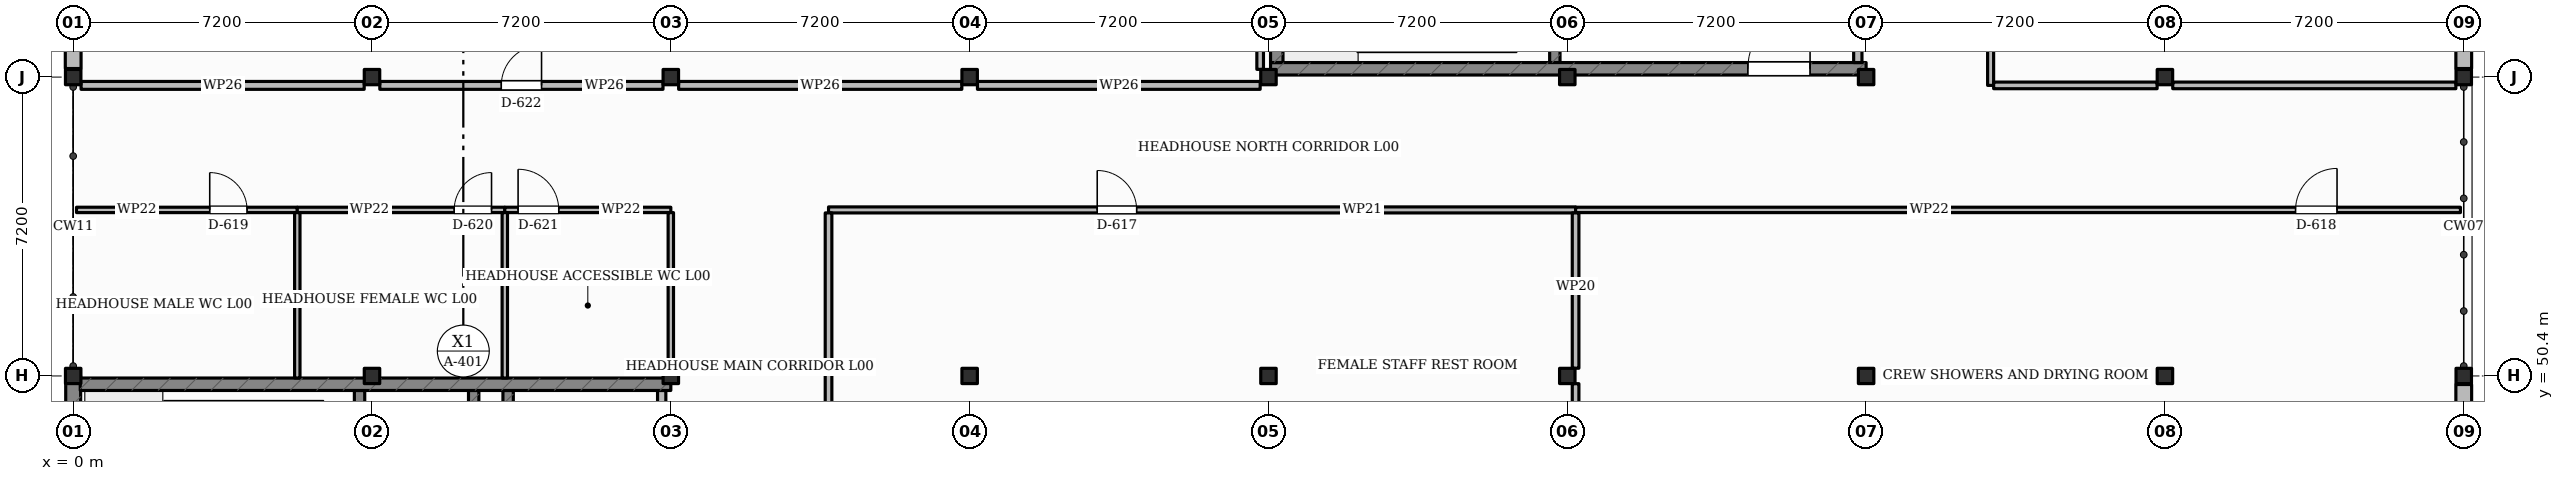
"""IFC4 building model, lengths in metres.
Left out: names, types, materials, properties, quantities, classifications, styles, units other than length and angle.
Written with IfcOpenShell. Run it as: python <this file> out.ifc"""

import sys

from ifc_helpers import new_model, si_unit, direction, frame, frame_2d, origin, origin_2d, place, context, subcontext, project, spatial, rectangle, i_section, extrude, element, fill, save


model = new_model("IFC4")
c1 = context("Model", 3, precision=1e-05, world=origin(), true_north=direction((0.0, 1.0)))
c2 = subcontext(c1, "Body", "Model", "MODEL_VIEW")
j1 = project(units=[si_unit("LENGTHUNIT", "METRE"), si_unit("PLANEANGLEUNIT", "RADIAN")], contexts=[c1])
p1 = place(None, origin())
s1 = spatial("IfcSite", under=j1, at=p1, CompositionType="ELEMENT")
p2 = place(p1, origin())
s2 = spatial("IfcBuilding", under=s1, at=p2, CompositionType="ELEMENT")
p3 = place(p2, origin())
s3 = spatial("IfcBuildingStorey", under=s2, at=p3, CompositionType="ELEMENT", Elevation=0.0)
for number, where, z_axis, x_axis in (
    (1, (0.0, 50.4, -0.3), (0.0, 0.0, 1.0), (1.0, 0.0, 0.0)),
    (2, (0.0, 57.6, -0.3), (0.0, 0.0, 1.0), (1.0, 0.0, 0.0)),
    (3, (7.2, 50.4, -0.3), (0.0, 0.0, 1.0), (1.0, 0.0, 0.0)),
    (4, (7.2, 57.6, -0.3), (0.0, 0.0, 1.0), (1.0, 0.0, 0.0)),
    (5, (14.4, 50.4, -0.3), (0.0, 0.0, 1.0), (1.0, 0.0, 0.0)),
    (6, (14.4, 57.6, -0.3), (0.0, 0.0, 1.0), (1.0, 0.0, 0.0)),
    (7, (21.6, 50.4, -0.3), (0.0, 0.0, 1.0), (1.0, 0.0, 0.0)),
    (8, (21.6, 57.6, -0.3), (0.0, 0.0, 1.0), (1.0, 0.0, 0.0)),
    (9, (28.8, 50.4, -0.3), (0.0, 0.0, 1.0), (1.0, 0.0, 0.0)),
    (10, (28.8, 57.6, -0.3), (0.0, 0.0, 1.0), (1.0, 0.0, 0.0)),
    (11, (36.0, 50.4, -0.3), (0.0, 0.0, 1.0), (1.0, 0.0, 0.0)),
    (12, (36.0, 57.6, -0.3), (0.0, 0.0, 1.0), (1.0, 0.0, 0.0)),
    (13, (43.2, 50.4, -0.3), (0.0, 0.0, 1.0), (1.0, 0.0, 0.0)),
    (14, (43.2, 57.6, -0.3), (0.0, 0.0, 1.0), (1.0, 0.0, 0.0)),
    (15, (50.4, 50.4, -0.3), (0.0, 0.0, 1.0), (1.0, 0.0, 0.0)),
    (16, (50.4, 57.6, -0.3), (0.0, 0.0, 1.0), (1.0, 0.0, 0.0)),
    (17, (57.6, 50.4, -0.3), (0.0, 0.0, 1.0), (1.0, 0.0, 0.0)),
    (18, (57.6, 57.6, -0.3), (0.0, 0.0, 1.0), (1.0, 0.0, 0.0)),
):
    element("IfcColumn", number, at=place(p3, frame(where, z_axis=z_axis, x_axis=x_axis)), inside=s3, PredefinedType="COLUMN", context=c2, shape_type="SweptSolid", body=[
        extrude(i_section(OverallWidth=0.373, OverallDepth=0.368, WebThickness=0.014, FlangeThickness=0.024, FilletRadius=0.015, at=origin_2d()), origin(), (0.0, 0.0, 1.0), 5.7),
    ])
p4 = place(p3, frame((0.0, 43.2, 0.0), z_axis=(0.0, 0.0, 1.0), x_axis=(0.0, 1.0, 0.0)))
e19 = element("IfcWall", 19, at=p4, inside=s3, PredefinedType="SHEAR", context=c2, shape_type="SweptSolid", body=[
    extrude(rectangle(XDim=7.2, YDim=0.36, at=frame_2d((3.6, 0.0))), origin(), (0.0, 0.0, 1.0), 4.594),
])
p5 = place(p4, frame((2.85, 0.0, 0.0)))
e20 = element("IfcOpeningElement", 20, at=p5, cuts=e19, PredefinedType="OPENING", context=c2, shape_type="SweptSolid", body=[
    extrude(rectangle(XDim=1.5, YDim=2.15, at=frame_2d((0.75, 1.075))), frame((0.0, 0.19, 0.0), z_axis=(0.0, -1.0, 0.0), x_axis=(1.0, 0.0, 0.0)), (0.0, 0.0, 1.0), 0.38),
])
p6 = place(p3, frame((0.0, 57.806, 0.0), z_axis=(0.0, 0.0, 1.0), x_axis=(0.0, 1.0, 0.0)))
e21 = element("IfcWall", 21, at=p6, inside=s3, PredefinedType="SOLIDWALL", context=c2, shape_type="SweptSolid", body=[
    extrude(rectangle(XDim=6.787, YDim=0.38, at=frame_2d((3.394, 0.0))), origin(), (0.0, 0.0, 1.0), 4.594),
])
p7 = place(p6, frame((2.194, 0.0, 1.05)))
e22 = element("IfcOpeningElement", 22, at=p7, cuts=e21, PredefinedType="OPENING", context=c2, shape_type="SweptSolid", body=[
    extrude(rectangle(XDim=2.4, YDim=1.8, at=frame_2d((1.2, 0.9))), frame((0.0, 0.2, 0.0), z_axis=(0.0, -1.0, 0.0), x_axis=(1.0, 0.0, 0.0)), (0.0, 0.0, 1.0), 0.4),
])
p8 = place(p3, frame((57.6, 64.594, 0.0), z_axis=(0.0, 0.0, 1.0), x_axis=(0.0, -1.0, 0.0)))
e23 = element("IfcWall", 23, at=p8, inside=s3, PredefinedType="SOLIDWALL", context=c2, shape_type="SweptSolid", body=[
    extrude(rectangle(XDim=6.787, YDim=0.38, at=frame_2d((3.394, 0.0))), origin(), (0.0, 0.0, 1.0), 4.594),
])
p9 = place(p3, frame((57.6, 50.194, 0.0), z_axis=(0.0, 0.0, 1.0), x_axis=(0.0, -1.0, 0.0)))
e24 = element("IfcWall", 24, at=p9, inside=s3, PredefinedType="SOLIDWALL", context=c2, shape_type="SweptSolid", body=[
    extrude(rectangle(XDim=6.787, YDim=0.38, at=frame_2d((3.394, 0.0))), origin(), (0.0, 0.0, 1.0), 4.368),
])
p10 = place(p9, frame((2.444, 0.0, 0.0)))
e25 = element("IfcOpeningElement", 25, at=p10, cuts=e24, PredefinedType="OPENING", context=c2, shape_type="SweptSolid", body=[
    extrude(rectangle(XDim=1.9, YDim=2.25, at=frame_2d((0.95, 1.125))), frame((0.0, 0.2, 0.0), z_axis=(0.0, -1.0, 0.0), x_axis=(1.0, 0.0, 0.0)), (0.0, 0.0, 1.0), 0.4),
])
p11 = place(p3, frame((6.9, 43.55, 0.0), z_axis=(0.0, 0.0, 1.0), x_axis=(0.0, 1.0, 0.0)))
e26 = element("IfcWall", 26, at=p11, inside=s3, PredefinedType="SHEAR", context=c2, shape_type="SweptSolid", body=[
    extrude(rectangle(XDim=6.5, YDim=0.25, at=frame_2d((3.25, 0.0))), origin(), (0.0, 0.0, 1.0), 4.45),
])
p12 = place(p11, frame((0.95, 0.0, 0.0)))
e27 = element("IfcOpeningElement", 27, at=p12, cuts=e26, PredefinedType="OPENING", context=c2, shape_type="SweptSolid", body=[
    extrude(rectangle(XDim=1.35, YDim=2.15, at=frame_2d((0.675, 1.075))), frame((0.0, 0.135, 0.0), z_axis=(0.0, -1.0, 0.0), x_axis=(1.0, 0.0, 0.0)), (0.0, 0.0, 1.0), 0.27),
])
p13 = place(p3, frame((9.65, 47.085, 0.0), z_axis=(0.0, 0.0, 1.0), x_axis=(0.0, 1.0, 0.0)))
e28 = element("IfcWall", 28, at=p13, inside=s3, PredefinedType="SHEAR", context=c2, shape_type="SweptSolid", body=[
    extrude(rectangle(XDim=2.965, YDim=0.25, at=frame_2d((1.482, 0.0))), origin(), (0.0, 0.0, 1.0), 4.45),
])
p14 = place(p3, frame((10.48, 47.085, 0.0), z_axis=(0.0, 0.0, 1.0), x_axis=(0.0, 1.0, 0.0)))
e29 = element("IfcWall", 29, at=p14, inside=s3, PredefinedType="SHEAR", context=c2, shape_type="SweptSolid", body=[
    extrude(rectangle(XDim=2.965, YDim=0.25, at=frame_2d((1.482, 0.0))), origin(), (0.0, 0.0, 1.0), 4.45),
])
p15 = place(p14, frame((0.9, 0.0, 0.0)))
e30 = element("IfcOpeningElement", 30, at=p15, cuts=e29, PredefinedType="OPENING", context=c2, shape_type="SweptSolid", body=[
    extrude(rectangle(XDim=0.92, YDim=2.05, at=frame_2d((0.46, 1.025))), frame((0.0, 0.135, 0.0), z_axis=(0.0, -1.0, 0.0), x_axis=(1.0, 0.0, 0.0)), (0.0, 0.0, 1.0), 0.27),
])
p16 = place(p3, frame((14.18, 43.55, 0.0), z_axis=(0.0, 0.0, 1.0), x_axis=(0.0, 1.0, 0.0)))
e31 = element("IfcWall", 31, at=p16, inside=s3, PredefinedType="SOLIDWALL", context=c2, shape_type="SweptSolid", body=[
    extrude(rectangle(XDim=6.5, YDim=0.2, at=frame_2d((3.25, 0.0))), origin(), (0.0, 0.0, 1.0), 4.45),
])
p17 = place(p16, frame((2.5, 0.0, 0.0)))
e32 = element("IfcOpeningElement", 32, at=p17, cuts=e31, PredefinedType="OPENING", context=c2, shape_type="SweptSolid", body=[
    extrude(rectangle(XDim=1.5, YDim=2.15, at=frame_2d((0.75, 1.075))), frame((0.0, 0.11, 0.0), z_axis=(0.0, -1.0, 0.0), x_axis=(1.0, 0.0, 0.0)), (0.0, 0.0, 1.0), 0.22),
])
p18 = place(p3, frame((0.17, 50.2, 0.0), z_axis=(0.0, 0.0, 1.0), x_axis=(1.0, 0.0, 0.0)))
e33 = element("IfcWall", 33, at=p18, inside=s3, PredefinedType="SHEAR", context=c2, shape_type="SweptSolid", body=[
    extrude(rectangle(XDim=14.23, YDim=0.3, at=frame_2d((7.115, 0.0))), origin(), (0.0, 0.0, 1.0), 4.45),
])
p19 = place(p3, frame((35.7, 57.95, 0.0), z_axis=(0.0, 0.0, 1.0), x_axis=(0.0, 1.0, 0.0)))
e34 = element("IfcWall", 34, at=p19, inside=s3, PredefinedType="SHEAR", context=c2, shape_type="SweptSolid", body=[
    extrude(rectangle(XDim=6.5, YDim=0.25, at=frame_2d((3.25, 0.0))), origin(), (0.0, 0.0, 1.0), 4.45),
])
p20 = place(p19, frame((0.95, 0.0, 0.0)))
e35 = element("IfcOpeningElement", 35, at=p20, cuts=e34, PredefinedType="OPENING", context=c2, shape_type="SweptSolid", body=[
    extrude(rectangle(XDim=1.35, YDim=2.15, at=frame_2d((0.675, 1.075))), frame((0.0, 0.135, 0.0), z_axis=(0.0, -1.0, 0.0), x_axis=(1.0, 0.0, 0.0)), (0.0, 0.0, 1.0), 0.27),
])
p21 = place(p3, frame((28.85, 57.8, 0.0), z_axis=(0.0, 0.0, 1.0), x_axis=(1.0, 0.0, 0.0)))
e36 = element("IfcWall", 36, at=p21, inside=s3, PredefinedType="SHEAR", context=c2, shape_type="SweptSolid", body=[
    extrude(rectangle(XDim=14.35, YDim=0.3, at=frame_2d((7.175, 0.0))), origin(), (0.0, 0.0, 1.0), 4.45),
])
p22 = place(p21, frame((11.5, 0.0, 0.0)))
e37 = element("IfcOpeningElement", 37, at=p22, cuts=e36, PredefinedType="OPENING", context=c2, shape_type="SweptSolid", body=[
    extrude(rectangle(XDim=1.5, YDim=2.15, at=frame_2d((0.75, 1.075))), frame((0.0, 0.16, 0.0), z_axis=(0.0, -1.0, 0.0), x_axis=(1.0, 0.0, 0.0)), (0.0, 0.0, 1.0), 0.32),
])
p23 = place(p3, frame((29.0, 57.95, 0.0), z_axis=(0.0, 0.0, 1.0), x_axis=(0.0, 1.0, 0.0)))
e38 = element("IfcWall", 38, at=p23, inside=s3, PredefinedType="SHEAR", context=c2, shape_type="SweptSolid", body=[
    extrude(rectangle(XDim=6.5, YDim=0.3, at=frame_2d((3.25, 0.0))), origin(), (0.0, 0.0, 1.0), 4.45),
])
p24 = place(p3, frame((43.0, 57.95, 0.0), z_axis=(0.0, 0.0, 1.0), x_axis=(0.0, 1.0, 0.0)))
e39 = element("IfcWall", 39, at=p24, inside=s3, PredefinedType="SOLIDWALL", context=c2, shape_type="SweptSolid", body=[
    extrude(rectangle(XDim=6.5, YDim=0.2, at=frame_2d((3.25, 0.0))), origin(), (0.0, 0.0, 1.0), 4.45),
])
p25 = place(p3, frame((18.2, 54.4, 0.0), z_axis=(0.0, 0.0, 1.0), x_axis=(1.0, 0.0, 0.0)))
e40 = element("IfcWall", 40, at=p25, inside=s3, PredefinedType="PARTITIONING", context=c2, shape_type="SweptSolid", body=[
    extrude(rectangle(XDim=18.0, YDim=0.145, at=frame_2d((9.0, 0.0))), origin(), (0.0, 0.0, 1.0), 3.55),
])
p26 = place(p25, frame((6.474, 0.0, 0.0)))
e41 = element("IfcOpeningElement", 41, at=p26, cuts=e40, PredefinedType="OPENING", context=c2, shape_type="SweptSolid", body=[
    extrude(rectangle(XDim=0.95, YDim=2.1, at=frame_2d((0.475, 1.05))), frame((0.0, 0.083, 0.0), z_axis=(0.0, -1.0, 0.0), x_axis=(1.0, 0.0, 0.0)), (0.0, 0.0, 1.0), 0.165),
])
p27 = place(p3, frame((36.2, 54.4, 0.0), z_axis=(0.0, 0.0, 1.0), x_axis=(1.0, 0.0, 0.0)))
e42 = element("IfcWall", 42, at=p27, inside=s3, PredefinedType="PARTITIONING", context=c2, shape_type="SweptSolid", body=[
    extrude(rectangle(XDim=21.32, YDim=0.13, at=frame_2d((10.66, 0.0))), origin(), (0.0, 0.0, 1.0), 3.55),
])
p28 = place(p27, frame((17.347, 0.0, 0.0)))
e43 = element("IfcOpeningElement", 43, at=p28, cuts=e42, PredefinedType="OPENING", context=c2, shape_type="SweptSolid", body=[
    extrude(rectangle(XDim=1.0, YDim=2.1, at=frame_2d((0.5, 1.05))), frame((0.0, 0.075, 0.0), z_axis=(0.0, -1.0, 0.0), x_axis=(1.0, 0.0, 0.0)), (0.0, 0.0, 1.0), 0.15),
])
p29 = place(p3, frame((0.08, 54.4, 0.0), z_axis=(0.0, 0.0, 1.0), x_axis=(1.0, 0.0, 0.0)))
e44 = element("IfcWall", 44, at=p29, inside=s3, PredefinedType="PARTITIONING", context=c2, shape_type="SweptSolid", body=[
    extrude(rectangle(XDim=5.32, YDim=0.13, at=frame_2d((2.66, 0.0))), origin(), (0.0, 0.0, 1.0), 3.55),
])
p30 = place(p29, frame((3.21, 0.0, 0.0)))
e45 = element("IfcOpeningElement", 45, at=p30, cuts=e44, PredefinedType="OPENING", context=c2, shape_type="SweptSolid", body=[
    extrude(rectangle(XDim=0.9, YDim=2.05, at=frame_2d((0.45, 1.025))), frame((0.0, 0.075, 0.0), z_axis=(0.0, -1.0, 0.0), x_axis=(1.0, 0.0, 0.0)), (0.0, 0.0, 1.0), 0.15),
])
p31 = place(p3, frame((5.4, 54.4, 0.0), z_axis=(0.0, 0.0, 1.0), x_axis=(1.0, 0.0, 0.0)))
e46 = element("IfcWall", 46, at=p31, inside=s3, PredefinedType="PARTITIONING", context=c2, shape_type="SweptSolid", body=[
    extrude(rectangle(XDim=5.0, YDim=0.13, at=frame_2d((2.5, 0.0))), origin(), (0.0, 0.0, 1.0), 3.55),
])
p32 = place(p31, frame((3.78, 0.0, 0.0)))
e47 = element("IfcOpeningElement", 47, at=p32, cuts=e46, PredefinedType="OPENING", context=c2, shape_type="SweptSolid", body=[
    extrude(rectangle(XDim=0.9, YDim=2.05, at=frame_2d((0.45, 1.025))), frame((0.0, 0.075, 0.0), z_axis=(0.0, -1.0, 0.0), x_axis=(1.0, 0.0, 0.0)), (0.0, 0.0, 1.0), 0.15),
])
p33 = place(p3, frame((10.4, 54.4, 0.0), z_axis=(0.0, 0.0, 1.0), x_axis=(1.0, 0.0, 0.0)))
e48 = element("IfcWall", 48, at=p33, inside=s3, PredefinedType="PARTITIONING", context=c2, shape_type="SweptSolid", body=[
    extrude(rectangle(XDim=4.0, YDim=0.13, at=frame_2d((2.0, 0.0))), origin(), (0.0, 0.0, 1.0), 3.55),
])
p34 = place(p33, frame((0.32, 0.0, 0.0)))
e49 = element("IfcOpeningElement", 49, at=p34, cuts=e48, PredefinedType="OPENING", context=c2, shape_type="SweptSolid", body=[
    extrude(rectangle(XDim=0.98, YDim=2.1, at=frame_2d((0.49, 1.05))), frame((0.0, 0.075, 0.0), z_axis=(0.0, -1.0, 0.0), x_axis=(1.0, 0.0, 0.0)), (0.0, 0.0, 1.0), 0.15),
])
p35 = place(p3, frame((0.19, 57.4, 0.0), z_axis=(0.0, 0.0, 1.0), x_axis=(1.0, 0.0, 0.0)))
e50 = element("IfcWall", 50, at=p35, inside=s3, PredefinedType="PARTITIONING", context=c2, shape_type="SweptSolid", body=[
    extrude(rectangle(XDim=6.822, YDim=0.19, at=frame_2d((3.411, 0.0))), origin(), (0.0, 0.0, 1.0), 3.55),
])
p36 = place(p3, frame((7.388, 57.4, 0.0), z_axis=(0.0, 0.0, 1.0), x_axis=(1.0, 0.0, 0.0)))
e51 = element("IfcWall", 51, at=p36, inside=s3, PredefinedType="PARTITIONING", context=c2, shape_type="SweptSolid", body=[
    extrude(rectangle(XDim=6.824, YDim=0.19, at=frame_2d((3.412, 0.0))), origin(), (0.0, 0.0, 1.0), 3.55),
])
p37 = place(p36, frame((2.927, 0.0, 0.0)))
e52 = element("IfcOpeningElement", 52, at=p37, cuts=e51, PredefinedType="OPENING", context=c2, shape_type="SweptSolid", body=[
    extrude(rectangle(XDim=0.97, YDim=2.12, at=frame_2d((0.485, 1.06))), frame((0.0, 0.105, 0.0), z_axis=(0.0, -1.0, 0.0), x_axis=(1.0, 0.0, 0.0)), (0.0, 0.0, 1.0), 0.21),
])
p38 = place(p3, frame((14.588, 57.4, 0.0), z_axis=(0.0, 0.0, 1.0), x_axis=(1.0, 0.0, 0.0)))
e53 = element("IfcWall", 53, at=p38, inside=s3, PredefinedType="PARTITIONING", context=c2, shape_type="SweptSolid", body=[
    extrude(rectangle(XDim=6.824, YDim=0.19, at=frame_2d((3.412, 0.0))), origin(), (0.0, 0.0, 1.0), 3.55),
])
p39 = place(p3, frame((21.788, 57.4, 0.0), z_axis=(0.0, 0.0, 1.0), x_axis=(1.0, 0.0, 0.0)))
e54 = element("IfcWall", 54, at=p39, inside=s3, PredefinedType="PARTITIONING", context=c2, shape_type="SweptSolid", body=[
    extrude(rectangle(XDim=6.812, YDim=0.19, at=frame_2d((3.406, 0.0))), origin(), (0.0, 0.0, 1.0), 3.55),
])
p40 = place(p3, frame((46.2, 57.4, 0.0), z_axis=(0.0, 0.0, 1.0), x_axis=(0.0, 1.0, 0.0)))
e55 = element("IfcWall", 55, at=p40, inside=s3, PredefinedType="PARTITIONING", context=c2, shape_type="SweptSolid", body=[
    extrude(rectangle(XDim=21.61, YDim=0.145, at=frame_2d((10.805, 0.0))), origin(), (0.0, 0.0, 1.0), 3.55),
])
p41 = place(p40, frame((17.628, 0.0, 0.0)))
e56 = element("IfcOpeningElement", 56, at=p41, cuts=e55, PredefinedType="OPENING", context=c2, shape_type="SweptSolid", body=[
    extrude(rectangle(XDim=1.08, YDim=2.15, at=frame_2d((0.54, 1.075))), frame((0.0, 0.083, 0.0), z_axis=(0.0, -1.0, 0.0), x_axis=(1.0, 0.0, 0.0)), (0.0, 0.0, 1.0), 0.165),
])
p42 = place(p3, frame((18.2, 43.68, 0.0), z_axis=(0.0, 0.0, 1.0), x_axis=(0.0, 1.0, 0.0)))
e57 = element("IfcWall", 57, at=p42, inside=s3, PredefinedType="PARTITIONING", context=c2, shape_type="SweptSolid", body=[
    extrude(rectangle(XDim=10.648, YDim=0.16, at=frame_2d((5.324, 0.0))), origin(), (0.0, 0.0, 1.0), 3.55),
])
p43 = place(p3, frame((36.2, 43.68, 0.0), z_axis=(0.0, 0.0, 1.0), x_axis=(0.0, 1.0, 0.0)))
e58 = element("IfcWall", 58, at=p43, inside=s3, PredefinedType="PARTITIONING", context=c2, shape_type="SweptSolid", body=[
    extrude(rectangle(XDim=6.534, YDim=0.16, at=frame_2d((3.267, 0.0))), origin(), (0.0, 0.0, 1.0), 3.55),
])
p44 = place(p3, frame((36.2, 50.586, 0.0), z_axis=(0.0, 0.0, 1.0), x_axis=(0.0, 1.0, 0.0)))
e59 = element("IfcWall", 59, at=p44, inside=s3, PredefinedType="PARTITIONING", context=c2, shape_type="SweptSolid", body=[
    extrude(rectangle(XDim=3.742, YDim=0.16, at=frame_2d((1.871, 0.0))), origin(), (0.0, 0.0, 1.0), 3.55),
])
p45 = place(p3, frame((5.4, 50.35, 0.0), z_axis=(0.0, 0.0, 1.0), x_axis=(0.0, 1.0, 0.0)))
e60 = element("IfcWall", 60, at=p45, inside=s3, PredefinedType="PARTITIONING", context=c2, shape_type="SweptSolid", body=[
    extrude(rectangle(XDim=3.985, YDim=0.13, at=frame_2d((1.992, 0.0))), origin(), (0.0, 0.0, 1.0), 2.219),
])
p46 = place(p3, frame((10.4, 50.35, 0.0), z_axis=(0.0, 0.0, 1.0), x_axis=(0.0, 1.0, 0.0)))
e61 = element("IfcWall", 61, at=p46, inside=s3, PredefinedType="PARTITIONING", context=c2, shape_type="SweptSolid", body=[
    extrude(rectangle(XDim=3.985, YDim=0.13, at=frame_2d((1.992, 0.0))), origin(), (0.0, 0.0, 1.0), 3.55),
])
p47 = place(p3, frame((14.4, 50.586, 0.0), z_axis=(0.0, 0.0, 1.0), x_axis=(0.0, 1.0, 0.0)))
e62 = element("IfcWall", 62, at=p47, inside=s3, PredefinedType="PARTITIONING", context=c2, shape_type="SweptSolid", body=[
    extrude(rectangle(XDim=3.749, YDim=0.13, at=frame_2d((1.875, 0.0))), origin(), (0.0, 0.0, 1.0), 3.55),
])
p48 = place(p3, frame((28.6, 57.786, 0.0), z_axis=(0.0, 0.0, 1.0), x_axis=(0.0, 1.0, 0.0)))
e63 = element("IfcWall", 63, at=p48, inside=s3, PredefinedType="PARTITIONING", context=c2, shape_type="SweptSolid", body=[
    extrude(rectangle(XDim=6.828, YDim=0.16, at=frame_2d((3.414, 0.0))), origin(), (0.0, 0.0, 1.0), 3.55),
])
p49 = place(p3, frame((46.273, 57.4, 0.0), z_axis=(0.0, 0.0, 1.0), x_axis=(1.0, 0.0, 0.0)))
e64 = element("IfcWall", 64, at=p49, inside=s3, PredefinedType="PARTITIONING", context=c2, shape_type="SweptSolid", body=[
    extrude(rectangle(XDim=3.939, YDim=0.16, at=frame_2d((1.969, 0.0))), origin(), (0.0, 0.0, 1.0), 3.55),
])
p50 = place(p3, frame((50.588, 57.4, 0.0), z_axis=(0.0, 0.0, 1.0), x_axis=(1.0, 0.0, 0.0)))
e65 = element("IfcWall", 65, at=p50, inside=s3, PredefinedType="PARTITIONING", context=c2, shape_type="SweptSolid", body=[
    extrude(rectangle(XDim=6.822, YDim=0.16, at=frame_2d((3.411, 0.0))), origin(), (0.0, 0.0, 1.0), 3.55),
])
p51 = place(p22, origin())
e66 = element("IfcDoor", 66, at=p51, inside=s3, OperationType="SINGLE_SWING_RIGHT", PredefinedType="DOOR", context=c2, shape_type="SweptSolid", body=[
    extrude(rectangle(XDim=1.5, YDim=2.15, at=frame_2d((0.75, 1.075))), frame((0.0, 0.025, 0.0), z_axis=(0.0, -1.0, 0.0), x_axis=(1.0, 0.0, 0.0)), (0.0, 0.0, 1.0), 0.05),
])
fill(e37, e66)
p52 = place(p26, origin())
e67 = element("IfcDoor", 67, at=p52, inside=s3, OperationType="SINGLE_SWING_LEFT", PredefinedType="DOOR", context=c2, shape_type="SweptSolid", body=[
    extrude(rectangle(XDim=0.95, YDim=2.1, at=frame_2d((0.475, 1.05))), frame((0.0, 0.025, 0.0), z_axis=(0.0, -1.0, 0.0), x_axis=(1.0, 0.0, 0.0)), (0.0, 0.0, 1.0), 0.05),
])
fill(e41, e67)
p53 = place(p28, origin())
e68 = element("IfcDoor", 68, at=p53, inside=s3, OperationType="SINGLE_SWING_RIGHT", PredefinedType="DOOR", context=c2, shape_type="SweptSolid", body=[
    extrude(rectangle(XDim=1.0, YDim=2.1, at=frame_2d((0.5, 1.05))), frame((0.0, 0.025, 0.0), z_axis=(0.0, -1.0, 0.0), x_axis=(1.0, 0.0, 0.0)), (0.0, 0.0, 1.0), 0.05),
])
fill(e43, e68)
p54 = place(p30, origin())
e69 = element("IfcDoor", 69, at=p54, inside=s3, OperationType="SINGLE_SWING_LEFT", PredefinedType="DOOR", context=c2, shape_type="SweptSolid", body=[
    extrude(rectangle(XDim=0.9, YDim=2.05, at=frame_2d((0.45, 1.025))), frame((0.0, 0.025, 0.0), z_axis=(0.0, -1.0, 0.0), x_axis=(1.0, 0.0, 0.0)), (0.0, 0.0, 1.0), 0.05),
])
fill(e45, e69)
p55 = place(p32, origin())
e70 = element("IfcDoor", 70, at=p55, inside=s3, OperationType="SINGLE_SWING_RIGHT", PredefinedType="DOOR", context=c2, shape_type="SweptSolid", body=[
    extrude(rectangle(XDim=0.9, YDim=2.05, at=frame_2d((0.45, 1.025))), frame((0.0, 0.025, 0.0), z_axis=(0.0, -1.0, 0.0), x_axis=(1.0, 0.0, 0.0)), (0.0, 0.0, 1.0), 0.05),
])
fill(e47, e70)
p56 = place(p34, origin())
e71 = element("IfcDoor", 71, at=p56, inside=s3, OperationType="SINGLE_SWING_LEFT", PredefinedType="DOOR", context=c2, shape_type="SweptSolid", body=[
    extrude(rectangle(XDim=0.98, YDim=2.1, at=frame_2d((0.49, 1.05))), frame((0.0, 0.025, 0.0), z_axis=(0.0, -1.0, 0.0), x_axis=(1.0, 0.0, 0.0)), (0.0, 0.0, 1.0), 0.05),
])
fill(e49, e71)
p57 = place(p37, origin())
e72 = element("IfcDoor", 72, at=p57, inside=s3, OperationType="SINGLE_SWING_RIGHT", PredefinedType="DOOR", context=c2, shape_type="SweptSolid", body=[
    extrude(rectangle(XDim=0.97, YDim=2.12, at=frame_2d((0.485, 1.06))), frame((0.0, 0.025, 0.0), z_axis=(0.0, -1.0, 0.0), x_axis=(1.0, 0.0, 0.0)), (0.0, 0.0, 1.0), 0.05),
])
fill(e52, e72)
save(model, sys.argv[1])
